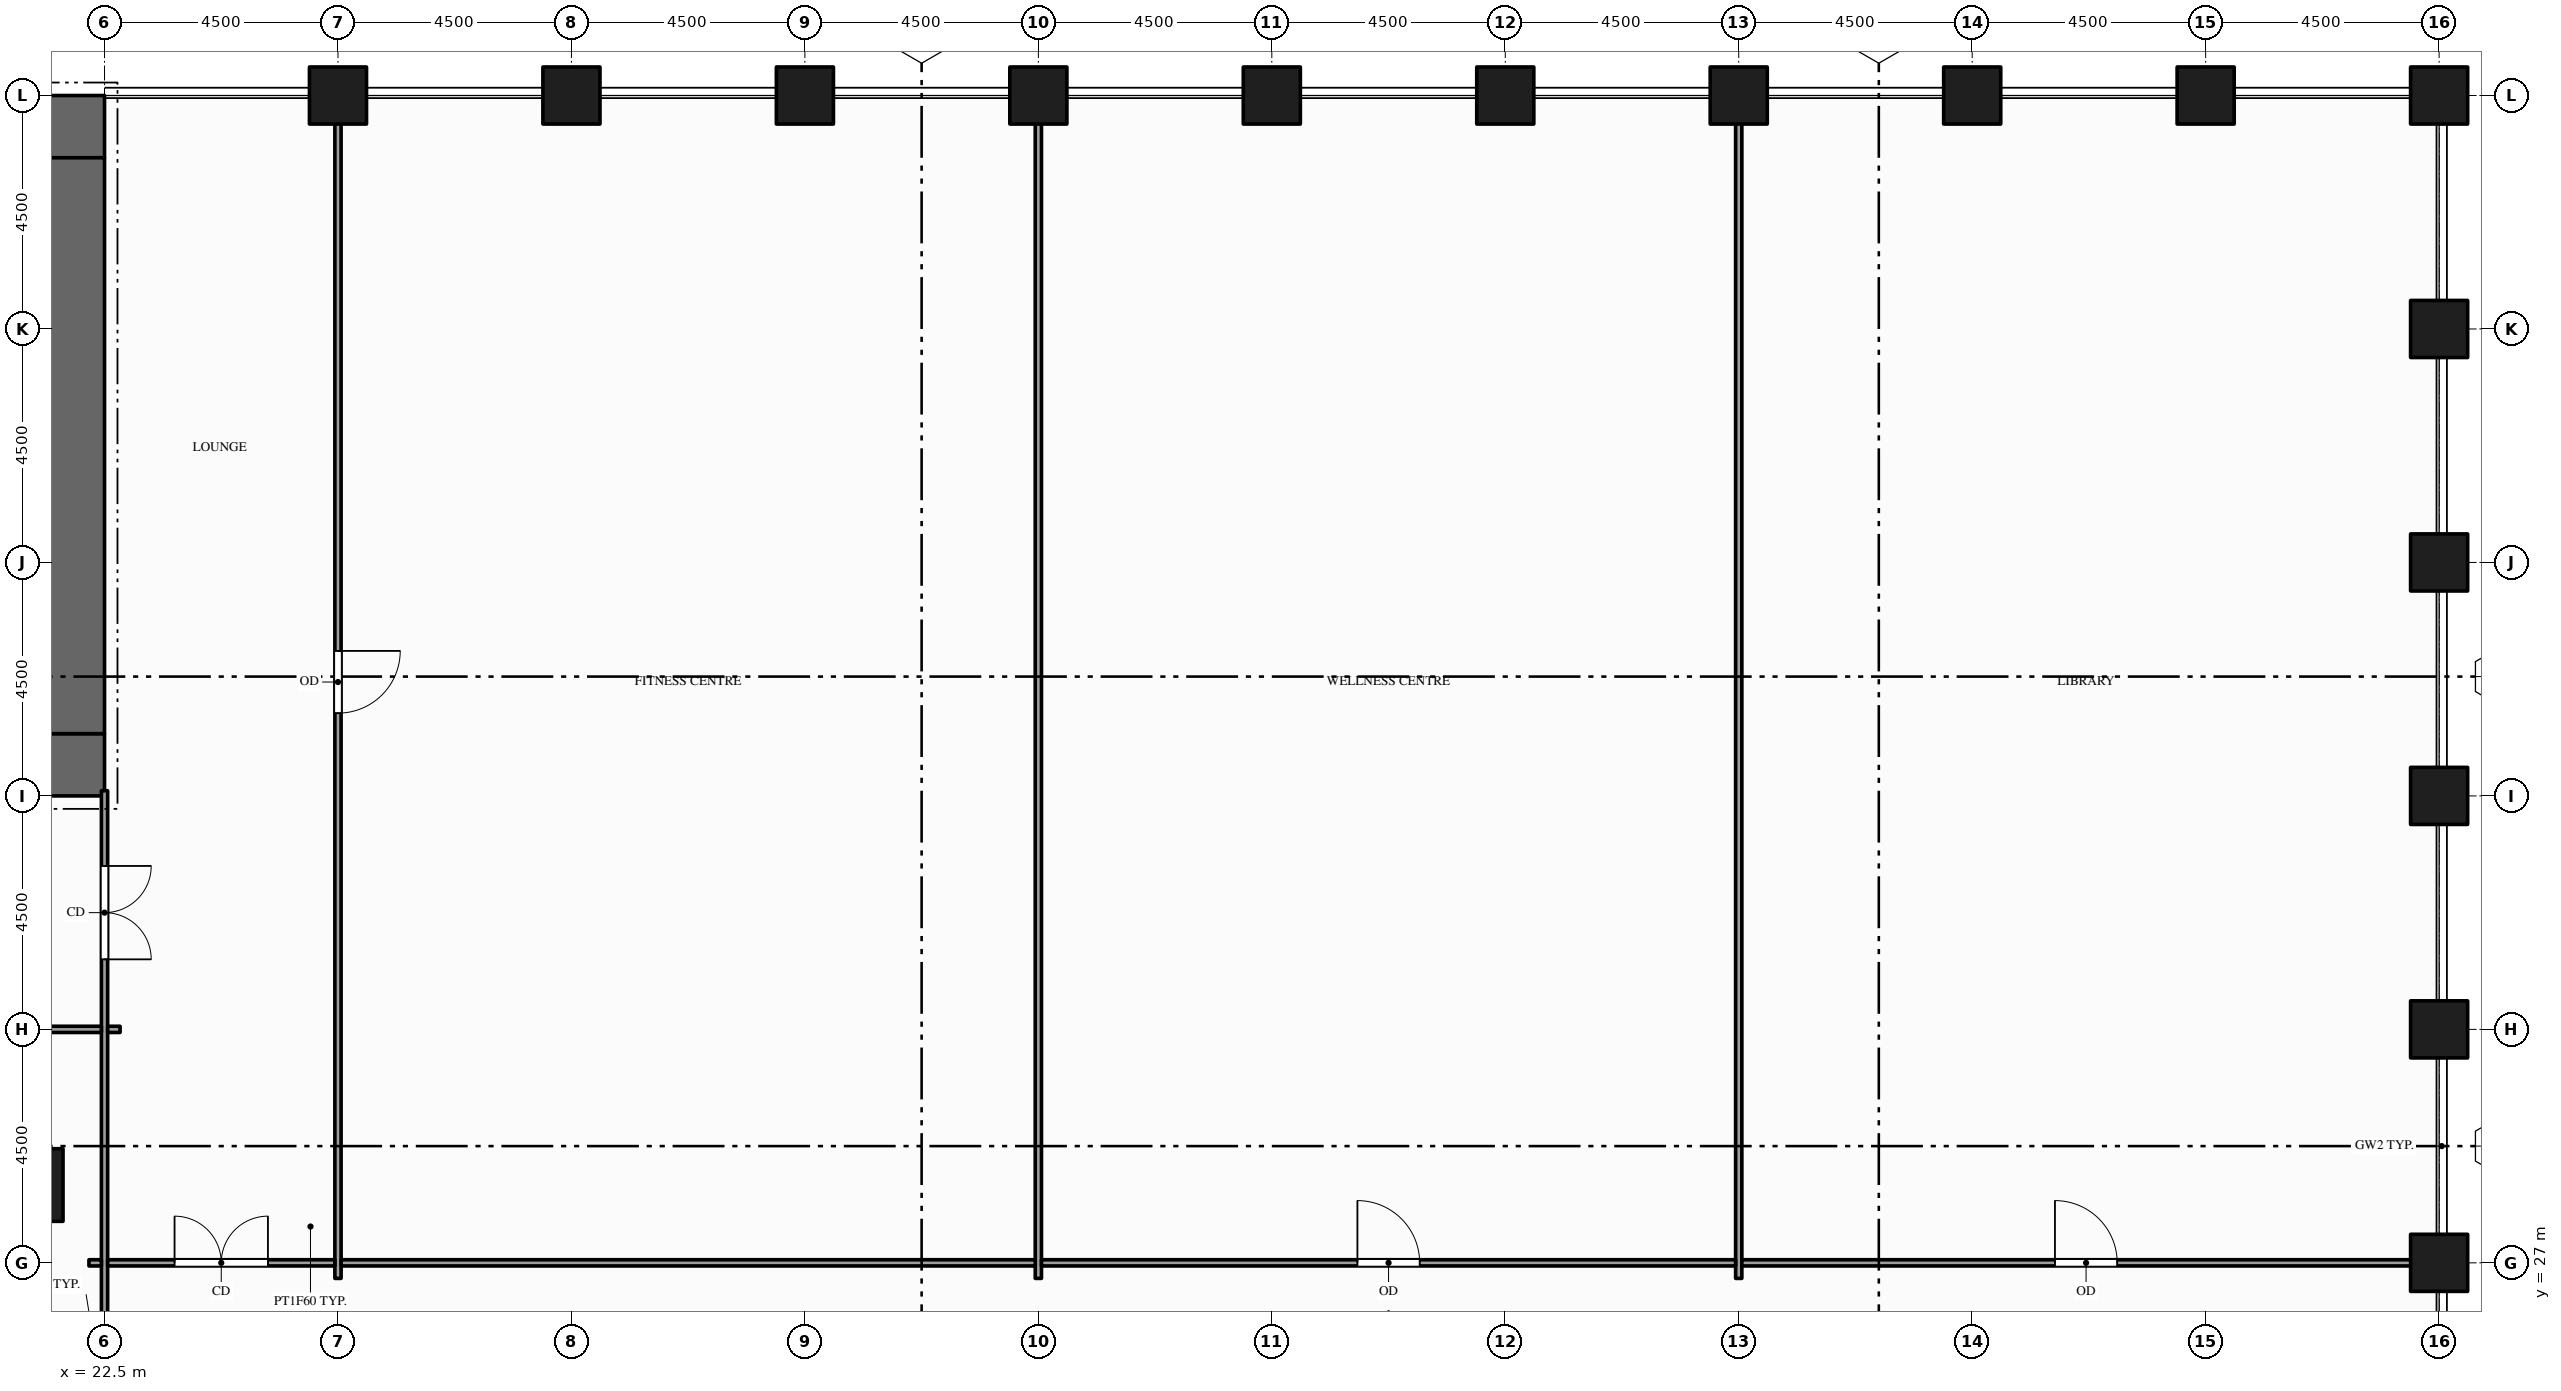
"""IFC4 building model, lengths in metres.
Left out: names, types, materials, properties, quantities, classifications, styles, units other than length and angle.
Written with IfcOpenShell. Run it as: python <this file> out.ifc"""

import sys

from ifc_helpers import new_model, si_unit, direction, frame, frame_2d, origin, origin_2d, place, context, subcontext, project, spatial, rectangle, hollow_rectangle, extrude, element, fill, save


model = new_model("IFC4")
c1 = context("Model", 3, precision=1e-05, world=origin(), true_north=direction((0.0, 1.0)))
c2 = subcontext(c1, "Body", "Model", "MODEL_VIEW")
j1 = project(units=[si_unit("LENGTHUNIT", "METRE"), si_unit("PLANEANGLEUNIT", "RADIAN")], contexts=[c1])
p1 = place(None, origin())
s1 = spatial("IfcSite", under=j1, at=p1, CompositionType="ELEMENT")
p2 = place(p1, origin())
s2 = spatial("IfcBuilding", under=s1, at=p2, CompositionType="ELEMENT")
p3 = place(p2, frame((0.0, 0.0, 19.0)))
s3 = spatial("IfcBuildingStorey", under=s2, at=p3, CompositionType="ELEMENT", Elevation=19.0)
p4 = place(p3, frame((0.0, 36.6, -0.15), z_axis=(0.0, 0.0, 1.0), x_axis=(1.0, 0.0, 0.0)))
e1 = element("IfcWall", 1, at=p4, inside=s3, PredefinedType="SHEAR", context=c2, shape_type="SweptSolid", body=[
    extrude(rectangle(XDim=22.5, YDim=1.2, at=frame_2d((11.25, 0.0))), origin(), (0.0, 0.0, 1.0), 5.0),
])
p5 = place(p4, frame((7.1, 0.0, 0.15)))
e2 = element("IfcOpeningElement", 2, at=p5, cuts=e1, PredefinedType="OPENING", context=c2, shape_type="SweptSolid", body=[
    extrude(rectangle(XDim=1.8, YDim=2.1, at=frame_2d((0.9, 1.05))), frame((0.0, 0.61, 0.0), z_axis=(0.0, -1.0, 0.0), x_axis=(1.0, 0.0, 0.0)), (0.0, 0.0, 1.0), 1.22),
])
p6 = place(p4, frame((13.15, 0.0, 0.15)))
e3 = element("IfcOpeningElement", 3, at=p6, cuts=e1, PredefinedType="OPENING", context=c2, shape_type="SweptSolid", body=[
    extrude(rectangle(XDim=1.1, YDim=2.1, at=frame_2d((0.55, 1.05))), frame((0.0, 0.61, 0.0), z_axis=(0.0, -1.0, 0.0), x_axis=(1.0, 0.0, 0.0)), (0.0, 0.0, 1.0), 1.22),
])
p7 = place(p4, frame((2.15, 0.0, 0.15)))
e4 = element("IfcOpeningElement", 4, at=p7, cuts=e1, PredefinedType="OPENING", context=c2, shape_type="SweptSolid", body=[
    extrude(rectangle(XDim=1.1, YDim=2.1, at=frame_2d((0.55, 1.05))), frame((0.0, 0.61, 0.0), z_axis=(0.0, -1.0, 0.0), x_axis=(1.0, 0.0, 0.0)), (0.0, 0.0, 1.0), 1.22),
])
p8 = place(p4, frame((19.35, 0.0, 0.15)))
e5 = element("IfcOpeningElement", 5, at=p8, cuts=e1, PredefinedType="OPENING", context=c2, shape_type="SweptSolid", body=[
    extrude(rectangle(XDim=1.1, YDim=2.1, at=frame_2d((0.55, 1.05))), frame((0.0, 0.61, 0.0), z_axis=(0.0, -1.0, 0.0), x_axis=(1.0, 0.0, 0.0)), (0.0, 0.0, 1.0), 1.22),
])
p9 = place(p3, frame((0.0, 48.9, -0.15), z_axis=(0.0, 0.0, 1.0), x_axis=(1.0, 0.0, 0.0)))
e6 = element("IfcWall", 6, at=p9, inside=s3, PredefinedType="SHEAR", context=c2, shape_type="SweptSolid", body=[
    extrude(rectangle(XDim=22.5, YDim=1.2, at=frame_2d((11.25, 0.0))), origin(), (0.0, 0.0, 1.0), 5.0),
])
p10 = place(p3, frame((21.9, 37.2, -0.15), z_axis=(0.0, 0.0, 1.0), x_axis=(0.0, 1.0, 0.0)))
e7 = element("IfcWall", 7, at=p10, inside=s3, PredefinedType="SHEAR", context=c2, shape_type="SweptSolid", body=[
    extrude(rectangle(XDim=11.1, YDim=1.2, at=frame_2d((5.55, 0.0))), origin(), (0.0, 0.0, 1.0), 5.0),
])
p11 = place(p3, frame((21.0, 28.5, -0.25), z_axis=(0.0, 0.0, 1.0), x_axis=(1.0, 0.0, 0.0)))
e8 = element("IfcColumn", 8, at=p11, inside=s3, PredefinedType="COLUMN", context=c2, shape_type="SweptSolid", body=[
    extrude(hollow_rectangle(XDim=1.4, YDim=1.4, WallThickness=0.08, at=origin_2d()), origin(), (0.0, 0.0, 1.0), 5.0),
])
for number, where, z_axis, x_axis in (
    (9, (27.0, 49.5, -0.25), (0.0, 0.0, 1.0), (1.0, 0.0, 0.0)),
    (10, (31.5, 49.5, -0.25), (0.0, 0.0, 1.0), (1.0, 0.0, 0.0)),
    (11, (36.0, 49.5, -0.25), (0.0, 0.0, 1.0), (1.0, 0.0, 0.0)),
    (12, (40.5, 49.5, -0.25), (0.0, 0.0, 1.0), (1.0, 0.0, 0.0)),
    (13, (45.0, 49.5, -0.25), (0.0, 0.0, 1.0), (1.0, 0.0, 0.0)),
    (14, (49.5, 49.5, -0.25), (0.0, 0.0, 1.0), (1.0, 0.0, 0.0)),
    (15, (54.0, 49.5, -0.25), (0.0, 0.0, 1.0), (1.0, 0.0, 0.0)),
    (16, (58.5, 49.5, -0.25), (0.0, 0.0, 1.0), (1.0, 0.0, 0.0)),
    (17, (63.0, 49.5, -0.25), (0.0, 0.0, 1.0), (1.0, 0.0, 0.0)),
    (18, (67.5, 27.0, -0.25), (0.0, 0.0, 1.0), (1.0, 0.0, 0.0)),
    (19, (67.5, 31.5, -0.25), (0.0, 0.0, 1.0), (1.0, 0.0, 0.0)),
    (20, (67.5, 36.0, -0.25), (0.0, 0.0, 1.0), (1.0, 0.0, 0.0)),
    (21, (67.5, 40.5, -0.25), (0.0, 0.0, 1.0), (1.0, 0.0, 0.0)),
    (22, (67.5, 45.0, -0.25), (0.0, 0.0, 1.0), (1.0, 0.0, 0.0)),
    (23, (67.5, 49.5, -0.25), (0.0, 0.0, 1.0), (1.0, 0.0, 0.0)),
):
    element("IfcColumn", number, at=place(p3, frame(where, z_axis=z_axis, x_axis=x_axis)), inside=s3, PredefinedType="COLUMN", context=c2, shape_type="SweptSolid", body=[
        extrude(hollow_rectangle(XDim=1.1, YDim=1.1, WallThickness=0.06, at=origin_2d()), origin(), (0.0, 0.0, 1.0), 5.0),
    ])
p12 = place(p3, frame((22.5, 0.15, 0.0), z_axis=(0.0, 0.0, 1.0), x_axis=(0.0, 1.0, 0.0)))
e24 = element("IfcWall", 24, at=p12, inside=s3, PredefinedType="PARTITIONING", context=c2, shape_type="SweptSolid", body=[
    extrude(rectangle(XDim=35.95, YDim=0.12, at=frame_2d((17.975, 0.0))), origin(), (0.0, 0.0, 1.0), 3.759),
])
p13 = place(p12, frame((9.225, 0.0, 0.0)))
e25 = element("IfcOpeningElement", 25, at=p13, cuts=e24, PredefinedType="OPENING", context=c2, shape_type="SweptSolid", body=[
    extrude(rectangle(XDim=1.5, YDim=2.1, at=frame_2d((0.75, 1.05))), frame((0.0, 0.07, 0.0), z_axis=(0.0, -1.0, 0.0), x_axis=(1.0, 0.0, 0.0)), (0.0, 0.0, 1.0), 0.14),
])
p14 = place(p12, frame((32.7, 0.0, 0.0)))
e26 = element("IfcOpeningElement", 26, at=p14, cuts=e24, PredefinedType="OPENING", context=c2, shape_type="SweptSolid", body=[
    extrude(rectangle(XDim=1.8, YDim=2.1, at=frame_2d((0.9, 1.05))), frame((0.0, 0.07, 0.0), z_axis=(0.0, -1.0, 0.0), x_axis=(1.0, 0.0, 0.0)), (0.0, 0.0, 1.0), 0.14),
])
p15 = place(p3, frame((27.0, 26.7, 0.0), z_axis=(0.0, 0.0, 1.0), x_axis=(0.0, 1.0, 0.0)))
e27 = element("IfcWall", 27, at=p15, inside=s3, PredefinedType="PARTITIONING", context=c2, shape_type="SweptSolid", body=[
    extrude(rectangle(XDim=22.65, YDim=0.12, at=frame_2d((11.325, 0.0))), origin(), (0.0, 0.0, 1.0), 3.66),
])
p16 = place(p15, frame((10.895, 0.0, 0.0)))
e28 = element("IfcOpeningElement", 28, at=p16, cuts=e27, PredefinedType="OPENING", context=c2, shape_type="SweptSolid", body=[
    extrude(rectangle(XDim=1.2, YDim=2.1, at=frame_2d((0.6, 1.05))), frame((0.0, 0.07, 0.0), z_axis=(0.0, -1.0, 0.0), x_axis=(1.0, 0.0, 0.0)), (0.0, 0.0, 1.0), 0.14),
])
for number, where, z_axis, x_axis in (
    (29, (40.5, 26.7, 0.0), (0.0, 0.0, 1.0), (0.0, 1.0, 0.0)),
    (30, (54.0, 26.7, 0.0), (0.0, 0.0, 1.0), (0.0, 1.0, 0.0)),
):
    element("IfcWall", number, at=place(p3, frame(where, z_axis=z_axis, x_axis=x_axis)), inside=s3, PredefinedType="PARTITIONING", context=c2, shape_type="SweptSolid", body=[
        extrude(rectangle(XDim=22.65, YDim=0.12, at=frame_2d((11.325, 0.0))), origin(), (0.0, 0.0, 1.0), 3.66),
    ])
p17 = place(p3, frame((22.2, 27.0, 0.0), z_axis=(0.0, 0.0, 1.0), x_axis=(1.0, 0.0, 0.0)))
e31 = element("IfcWall", 31, at=p17, inside=s3, PredefinedType="PARTITIONING", context=c2, shape_type="SweptSolid", body=[
    extrude(rectangle(XDim=0.24, YDim=0.12, at=frame_2d((0.12, 0.0))), origin(), (0.0, 0.0, 1.0), 3.759),
])
p18 = place(p3, frame((22.56, 27.0, 0.0), z_axis=(0.0, 0.0, 1.0), x_axis=(1.0, 0.0, 0.0)))
e32 = element("IfcWall", 32, at=p18, inside=s3, PredefinedType="PARTITIONING", context=c2, shape_type="SweptSolid", body=[
    extrude(rectangle(XDim=4.38, YDim=0.12, at=frame_2d((2.19, 0.0))), origin(), (0.0, 0.0, 1.0), 3.66),
])
p19 = place(p18, frame((1.29, 0.0, 0.0)))
e33 = element("IfcOpeningElement", 33, at=p19, cuts=e32, PredefinedType="OPENING", context=c2, shape_type="SweptSolid", body=[
    extrude(rectangle(XDim=1.8, YDim=2.1, at=frame_2d((0.9, 1.05))), frame((0.0, 0.07, 0.0), z_axis=(0.0, -1.0, 0.0), x_axis=(1.0, 0.0, 0.0)), (0.0, 0.0, 1.0), 0.14),
])
p20 = place(p3, frame((27.06, 27.0, 0.0), z_axis=(0.0, 0.0, 1.0), x_axis=(1.0, 0.0, 0.0)))
e34 = element("IfcWall", 34, at=p20, inside=s3, PredefinedType="PARTITIONING", context=c2, shape_type="SweptSolid", body=[
    extrude(rectangle(XDim=13.38, YDim=0.12, at=frame_2d((6.69, 0.0))), origin(), (0.0, 0.0, 1.0), 3.66),
])
p21 = place(p3, frame((40.56, 27.0, 0.0), z_axis=(0.0, 0.0, 1.0), x_axis=(1.0, 0.0, 0.0)))
e35 = element("IfcWall", 35, at=p21, inside=s3, PredefinedType="PARTITIONING", context=c2, shape_type="SweptSolid", body=[
    extrude(rectangle(XDim=13.38, YDim=0.12, at=frame_2d((6.69, 0.0))), origin(), (0.0, 0.0, 1.0), 3.66),
])
p22 = place(p21, frame((6.09, 0.0, 0.0)))
e36 = element("IfcOpeningElement", 36, at=p22, cuts=e35, PredefinedType="OPENING", context=c2, shape_type="SweptSolid", body=[
    extrude(rectangle(XDim=1.2, YDim=2.1, at=frame_2d((0.6, 1.05))), frame((0.0, 0.07, 0.0), z_axis=(0.0, -1.0, 0.0), x_axis=(1.0, 0.0, 0.0)), (0.0, 0.0, 1.0), 0.14),
])
p23 = place(p3, frame((54.06, 27.0, 0.0), z_axis=(0.0, 0.0, 1.0), x_axis=(1.0, 0.0, 0.0)))
e37 = element("IfcWall", 37, at=p23, inside=s3, PredefinedType="PARTITIONING", context=c2, shape_type="SweptSolid", body=[
    extrude(rectangle(XDim=13.29, YDim=0.12, at=frame_2d((6.645, 0.0))), origin(), (0.0, 0.0, 1.0), 3.66),
])
p24 = place(p23, frame((6.035, 0.0, 0.0)))
e38 = element("IfcOpeningElement", 38, at=p24, cuts=e37, PredefinedType="OPENING", context=c2, shape_type="SweptSolid", body=[
    extrude(rectangle(XDim=1.2, YDim=2.1, at=frame_2d((0.6, 1.05))), frame((0.0, 0.07, 0.0), z_axis=(0.0, -1.0, 0.0), x_axis=(1.0, 0.0, 0.0)), (0.0, 0.0, 1.0), 0.14),
])
p25 = place(p3, frame((11.31, 31.5, 0.0), z_axis=(0.0, 0.0, 1.0), x_axis=(1.0, 0.0, 0.0)))
e39 = element("IfcWall", 39, at=p25, inside=s3, PredefinedType="PARTITIONING", context=c2, shape_type="SweptSolid", body=[
    extrude(rectangle(XDim=11.13, YDim=0.12, at=frame_2d((5.565, 0.0))), origin(), (0.0, 0.0, 1.0), 3.5),
])
p26 = place(p3, frame((22.56, 31.5, 0.0), z_axis=(0.0, 0.0, 1.0), x_axis=(1.0, 0.0, 0.0)))
e40 = element("IfcWall", 40, at=p26, inside=s3, PredefinedType="PARTITIONING", context=c2, shape_type="SweptSolid", body=[
    extrude(rectangle(XDim=0.24, YDim=0.12, at=frame_2d((0.12, 0.0))), origin(), (0.0, 0.0, 1.0), 3.759),
])
p27 = place(p19, origin())
e41 = element("IfcDoor", 41, at=p27, inside=s3, OperationType="DOUBLE_DOOR_SINGLE_SWING", PredefinedType="DOOR", context=c2, shape_type="SweptSolid", body=[
    extrude(rectangle(XDim=1.8, YDim=2.1, at=frame_2d((0.9, 1.05))), frame((0.0, 0.025, 0.0), z_axis=(0.0, -1.0, 0.0), x_axis=(1.0, 0.0, 0.0)), (0.0, 0.0, 1.0), 0.05),
])
fill(e33, e41)
p28 = place(p16, origin())
e42 = element("IfcDoor", 42, at=p28, inside=s3, OperationType="SINGLE_SWING_RIGHT", PredefinedType="DOOR", context=c2, shape_type="SweptSolid", body=[
    extrude(rectangle(XDim=1.2, YDim=2.1, at=frame_2d((0.6, 1.05))), frame((0.0, 0.025, 0.0), z_axis=(0.0, -1.0, 0.0), x_axis=(1.0, 0.0, 0.0)), (0.0, 0.0, 1.0), 0.05),
])
fill(e28, e42)
p29 = place(p22, origin())
e43 = element("IfcDoor", 43, at=p29, inside=s3, OperationType="SINGLE_SWING_LEFT", PredefinedType="DOOR", context=c2, shape_type="SweptSolid", body=[
    extrude(rectangle(XDim=1.2, YDim=2.1, at=frame_2d((0.6, 1.05))), frame((0.0, 0.025, 0.0), z_axis=(0.0, -1.0, 0.0), x_axis=(1.0, 0.0, 0.0)), (0.0, 0.0, 1.0), 0.05),
])
fill(e36, e43)
p30 = place(p24, origin())
e44 = element("IfcDoor", 44, at=p30, inside=s3, OperationType="SINGLE_SWING_LEFT", PredefinedType="DOOR", context=c2, shape_type="SweptSolid", body=[
    extrude(rectangle(XDim=1.2, YDim=2.1, at=frame_2d((0.6, 1.05))), frame((0.0, 0.025, 0.0), z_axis=(0.0, -1.0, 0.0), x_axis=(1.0, 0.0, 0.0)), (0.0, 0.0, 1.0), 0.05),
])
fill(e38, e44)
p31 = place(p14, origin())
e45 = element("IfcDoor", 45, at=p31, inside=s3, OperationType="DOUBLE_DOOR_SINGLE_SWING", PredefinedType="DOOR", context=c2, shape_type="SweptSolid", body=[
    extrude(rectangle(XDim=1.8, YDim=2.1, at=frame_2d((0.9, 1.05))), frame((0.0, 0.025, 0.0), z_axis=(0.0, -1.0, 0.0), x_axis=(1.0, 0.0, 0.0)), (0.0, 0.0, 1.0), 0.05),
])
fill(e26, e45)
save(model, sys.argv[1])
